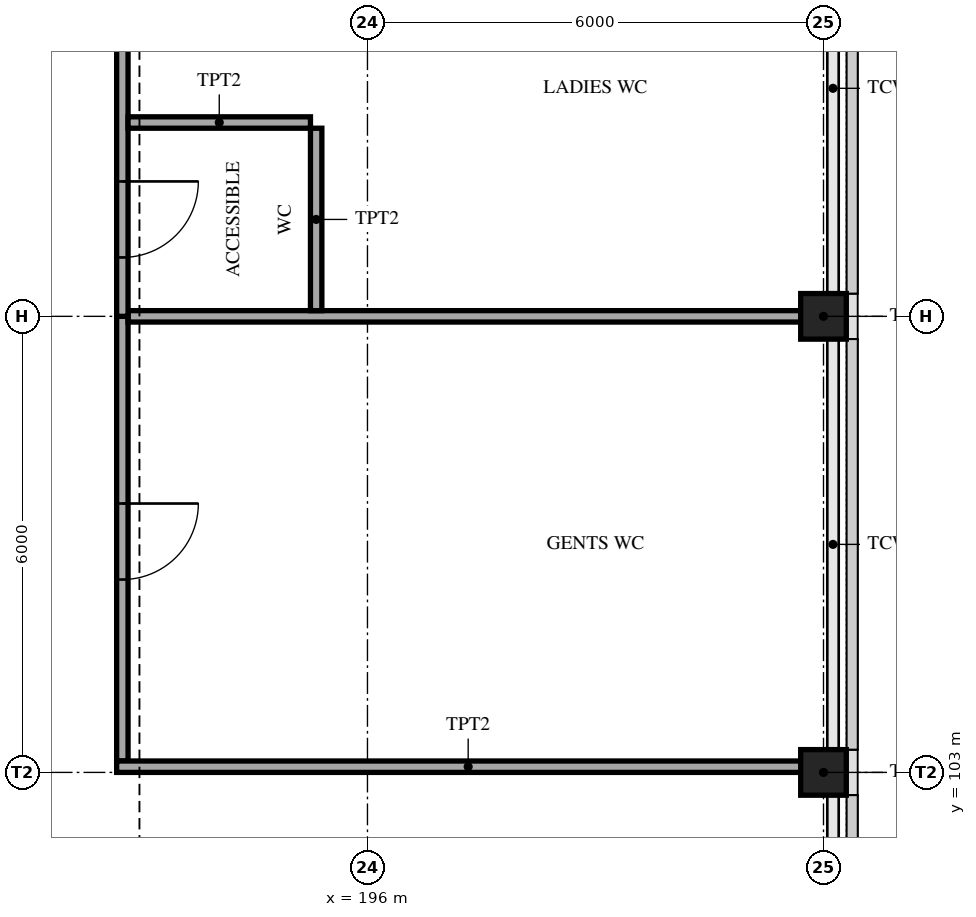
"""IFC4 building model, lengths in metres.
Left out: names, types, materials, properties, quantities, classifications, styles, units other than length and angle.
Written with IfcOpenShell. Run it as: python <this file> out.ifc"""

import sys

from ifc_helpers import new_model, si_unit, direction, frame, frame_2d, origin, origin_2d, place, context, subcontext, project, spatial, rectangle, hollow_rectangle, extrude, element, fill, save


model = new_model("IFC4")
c1 = context("Model", 3, precision=1e-05, world=origin(), true_north=direction((0.0, 1.0)))
c2 = subcontext(c1, "Body", "Model", "MODEL_VIEW")
j1 = project(units=[si_unit("LENGTHUNIT", "METRE"), si_unit("PLANEANGLEUNIT", "RADIAN")], contexts=[c1])
p1 = place(None, origin())
s1 = spatial("IfcSite", under=j1, at=p1, CompositionType="ELEMENT")
p2 = place(p1, origin())
s2 = spatial("IfcBuilding", under=s1, at=p2, CompositionType="ELEMENT")
p3 = place(p2, frame((0.0, 0.0, 5.0)))
s3 = spatial("IfcBuildingStorey", under=s2, at=p3, CompositionType="ELEMENT", Elevation=5.0)
for number, where, z_axis, x_axis in (
    (1, (202.0, 103.0, 0.0), (0.0, 0.0, 1.0), (1.0, 0.0, 0.0)),
    (2, (202.0, 109.0, 0.0), (0.0, 0.0, 1.0), (1.0, 0.0, 0.0)),
):
    element("IfcColumn", number, at=place(p3, frame(where, z_axis=z_axis, x_axis=x_axis)), inside=s3, PredefinedType="COLUMN", context=c2, shape_type="SweptSolid", body=[
        extrude(hollow_rectangle(XDim=0.6, YDim=0.6, WallThickness=0.04, at=origin_2d()), origin(), (0.0, 0.0, 1.0), 5.0),
    ])
p4 = place(p3, frame((192.775, 103.15, 0.0), z_axis=(0.0, 0.0, 1.0), x_axis=(0.0, 1.0, 0.0)))
e3 = element("IfcWall", 3, at=p4, inside=s3, PredefinedType="PARTITIONING", context=c2, shape_type="SweptSolid", body=[
    extrude(rectangle(XDim=5.85, YDim=0.15, at=frame_2d((2.925, 0.0))), origin(), (0.0, 0.0, 1.0), 4.2),
])
p5 = place(p4, frame((2.387, 0.0, 0.0)))
e4 = element("IfcOpeningElement", 4, at=p5, cuts=e3, PredefinedType="OPENING", context=c2, shape_type="SweptSolid", body=[
    extrude(rectangle(XDim=1.0, YDim=2.1, at=frame_2d((0.5, 1.05))), frame((0.0, 0.085, 0.0), z_axis=(0.0, -1.0, 0.0), x_axis=(1.0, 0.0, 0.0)), (0.0, 0.0, 1.0), 0.17),
])
p6 = place(p3, frame((192.85, 109.0, 0.0), z_axis=(0.0, 0.0, 1.0), x_axis=(1.0, 0.0, 0.0)))
e5 = element("IfcWall", 5, at=p6, inside=s3, PredefinedType="PARTITIONING", context=c2, shape_type="SweptSolid", body=[
    extrude(rectangle(XDim=9.1, YDim=0.15, at=frame_2d((4.55, 0.0))), origin(), (0.0, 0.0, 1.0), 4.2),
])
p7 = place(p3, frame((192.775, 109.0, 0.0), z_axis=(0.0, 0.0, 1.0), x_axis=(0.0, 1.0, 0.0)))
e6 = element("IfcWall", 6, at=p7, inside=s3, PredefinedType="PARTITIONING", context=c2, shape_type="SweptSolid", body=[
    extrude(rectangle(XDim=6.0, YDim=0.15, at=frame_2d((3.0, 0.0))), origin(), (0.0, 0.0, 1.0), 4.2),
])
p8 = place(p7, frame((3.7, 0.0, 0.0)))
e7 = element("IfcOpeningElement", 7, at=p8, cuts=e6, PredefinedType="OPENING", context=c2, shape_type="SweptSolid", body=[
    extrude(rectangle(XDim=1.0, YDim=2.1, at=frame_2d((0.5, 1.05))), frame((0.0, 0.085, 0.0), z_axis=(0.0, -1.0, 0.0), x_axis=(1.0, 0.0, 0.0)), (0.0, 0.0, 1.0), 0.17),
])
p9 = place(p7, frame((0.775, 0.0, 0.0)))
e8 = element("IfcOpeningElement", 8, at=p9, cuts=e6, PredefinedType="OPENING", context=c2, shape_type="SweptSolid", body=[
    extrude(rectangle(XDim=1.0, YDim=2.1, at=frame_2d((0.5, 1.05))), frame((0.0, 0.085, 0.0), z_axis=(0.0, -1.0, 0.0), x_axis=(1.0, 0.0, 0.0)), (0.0, 0.0, 1.0), 0.17),
])
p10 = place(p3, frame((195.325, 109.075, 0.0), z_axis=(0.0, 0.0, 1.0), x_axis=(0.0, 1.0, 0.0)))
e9 = element("IfcWall", 9, at=p10, inside=s3, PredefinedType="PARTITIONING", context=c2, shape_type="SweptSolid", body=[
    extrude(rectangle(XDim=2.4, YDim=0.15, at=frame_2d((1.2, 0.0))), origin(), (0.0, 0.0, 1.0), 4.2),
])
p11 = place(p3, frame((192.85, 111.55, 0.0), z_axis=(0.0, 0.0, 1.0), x_axis=(1.0, 0.0, 0.0)))
e10 = element("IfcWall", 10, at=p11, inside=s3, PredefinedType="PARTITIONING", context=c2, shape_type="SweptSolid", body=[
    extrude(rectangle(XDim=2.4, YDim=0.15, at=frame_2d((1.2, 0.0))), origin(), (0.0, 0.0, 1.0), 4.4),
])
p12 = place(p3, frame((192.7, 103.075, 0.0), z_axis=(0.0, 0.0, 1.0), x_axis=(1.0, 0.0, 0.0)))
e11 = element("IfcWall", 11, at=p12, inside=s3, PredefinedType="PARTITIONING", context=c2, shape_type="SweptSolid", body=[
    extrude(rectangle(XDim=9.25, YDim=0.15, at=frame_2d((4.625, 0.0))), origin(), (0.0, 0.0, 1.0), 4.2),
])
p13 = place(p5, frame((1.0, 0.0, 0.0), z_axis=(0.0, 0.0, 1.0), x_axis=(-1.0, 0.0, 0.0)))
e12 = element("IfcDoor", 12, at=p13, inside=s3, OperationType="SINGLE_SWING_LEFT", PredefinedType="DOOR", context=c2, shape_type="SweptSolid", body=[
    extrude(rectangle(XDim=1.0, YDim=2.1, at=frame_2d((0.5, 1.05))), frame((0.0, 0.025, 0.0), z_axis=(0.0, -1.0, 0.0), x_axis=(1.0, 0.0, 0.0)), (0.0, 0.0, 1.0), 0.05),
])
fill(e4, e12)
p14 = place(p9, frame((1.0, 0.0, 0.0), z_axis=(0.0, 0.0, 1.0), x_axis=(-1.0, 0.0, 0.0)))
e13 = element("IfcDoor", 13, at=p14, inside=s3, OperationType="SINGLE_SWING_LEFT", PredefinedType="DOOR", context=c2, shape_type="SweptSolid", body=[
    extrude(rectangle(XDim=1.0, YDim=2.1, at=frame_2d((0.5, 1.05))), frame((0.0, 0.025, 0.0), z_axis=(0.0, -1.0, 0.0), x_axis=(1.0, 0.0, 0.0)), (0.0, 0.0, 1.0), 0.05),
])
fill(e8, e13)
save(model, sys.argv[1])
